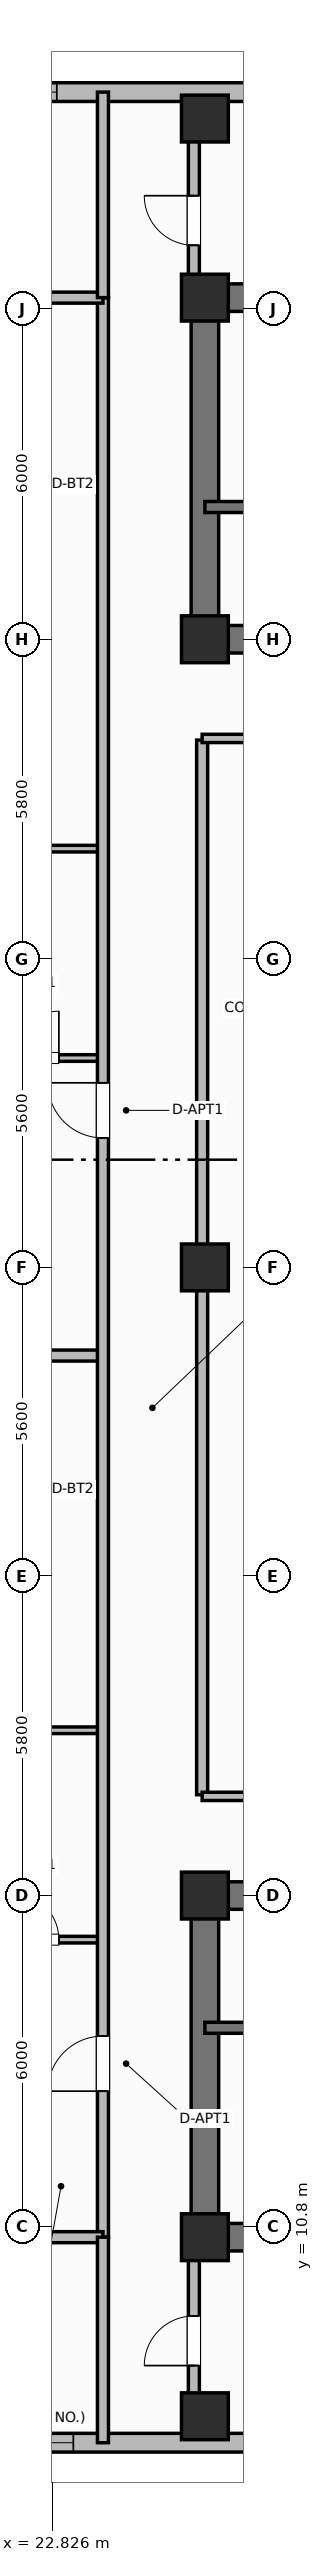
"""IFC4 building model, lengths in metres.
Left out: names, types, materials, properties, quantities, classifications, styles, units other than length and angle.
Written with IfcOpenShell. Run it as: python <this file> out.ifc"""

import sys

from ifc_helpers import new_model, si_unit, direction, frame, frame_2d, origin, origin_2d, place, context, subcontext, project, spatial, rectangle, extrude, element, fill, save


model = new_model("IFC4")
c1 = context("Model", 3, precision=1e-05, world=origin(), true_north=direction((0.0, 1.0)))
c2 = subcontext(c1, "Body", "Model", "MODEL_VIEW")
j1 = project(units=[si_unit("LENGTHUNIT", "METRE"), si_unit("PLANEANGLEUNIT", "RADIAN")], contexts=[c1])
p1 = place(None, origin())
s1 = spatial("IfcSite", under=j1, at=p1, CompositionType="ELEMENT")
p2 = place(p1, origin())
s2 = spatial("IfcBuilding", under=s1, at=p2, CompositionType="ELEMENT")
p3 = place(p2, frame((0.0, 0.0, 203.1)))
s3 = spatial("IfcBuildingStorey", under=s2, at=p3, CompositionType="ELEMENT", Elevation=203.1)
p4 = place(p3, frame((52.8, 10.6, 0.0), z_axis=(0.0, 0.0, 1.0), x_axis=(-1.0, 0.0, 0.0)))
e1 = element("IfcWall", 1, at=p4, inside=s3, PredefinedType="SHEAR", context=c2, shape_type="SweptSolid", body=[
    extrude(rectangle(XDim=27.2, YDim=0.5, at=frame_2d((13.6, 0.0))), origin(), (0.0, 0.0, 1.0), 4.2),
])
p5 = place(p3, frame((25.6, 10.85, 0.0), z_axis=(0.0, 0.0, 1.0), x_axis=(0.0, 1.0, 0.0)))
e2 = element("IfcWall", 2, at=p5, inside=s3, PredefinedType="SHEAR", context=c2, shape_type="SweptSolid", body=[
    extrude(rectangle(XDim=5.7, YDim=0.5, at=frame_2d((2.85, 0.0))), origin(), (0.0, 0.0, 1.0), 4.2),
])
p6 = place(p3, frame((25.6, 16.8, 0.0), z_axis=(0.0, 0.0, 1.0), x_axis=(1.0, 0.0, 0.0)))
e3 = element("IfcWall", 3, at=p6, inside=s3, PredefinedType="SHEAR", context=c2, shape_type="SweptSolid", body=[
    extrude(rectangle(XDim=27.2, YDim=0.5, at=frame_2d((13.6, 0.0))), origin(), (0.0, 0.0, 1.0), 4.2),
])
p7 = place(p6, frame((1.8, 0.0, 0.0)))
e4 = element("IfcOpeningElement", 4, at=p7, cuts=e3, PredefinedType="OPENING", context=c2, shape_type="SweptSolid", body=[
    extrude(rectangle(XDim=1.1, YDim=2.15, at=frame_2d((0.55, 1.075))), frame((0.0, 0.26, 0.0), z_axis=(0.0, -1.0, 0.0), x_axis=(1.0, 0.0, 0.0)), (0.0, 0.0, 1.0), 0.52),
])
p8 = place(p6, frame((5.6, 0.0, 0.0)))
e5 = element("IfcOpeningElement", 5, at=p8, cuts=e3, PredefinedType="OPENING", context=c2, shape_type="SweptSolid", body=[
    extrude(rectangle(XDim=0.85, YDim=2.1, at=frame_2d((0.425, 1.05))), frame((0.0, 0.26, 0.0), z_axis=(0.0, -1.0, 0.0), x_axis=(1.0, 0.0, 0.0)), (0.0, 0.0, 1.0), 0.52),
])
p9 = place(p6, frame((13.0, 0.0, 0.0)))
e6 = element("IfcOpeningElement", 6, at=p9, cuts=e3, PredefinedType="OPENING", context=c2, shape_type="SweptSolid", body=[
    extrude(rectangle(XDim=1.2, YDim=2.15, at=frame_2d((0.6, 1.075))), frame((0.0, 0.26, 0.0), z_axis=(0.0, -1.0, 0.0), x_axis=(1.0, 0.0, 0.0)), (0.0, 0.0, 1.0), 0.52),
])
p10 = place(p6, frame((19.2, 0.0, 0.0)))
e7 = element("IfcOpeningElement", 7, at=p10, cuts=e3, PredefinedType="OPENING", context=c2, shape_type="SweptSolid", body=[
    extrude(rectangle(XDim=0.85, YDim=2.1, at=frame_2d((0.425, 1.05))), frame((0.0, 0.26, 0.0), z_axis=(0.0, -1.0, 0.0), x_axis=(1.0, 0.0, 0.0)), (0.0, 0.0, 1.0), 0.52),
])
p11 = place(p6, frame((23.8, 0.0, 0.0)))
e8 = element("IfcOpeningElement", 8, at=p11, cuts=e3, PredefinedType="OPENING", context=c2, shape_type="SweptSolid", body=[
    extrude(rectangle(XDim=0.9, YDim=2.1, at=frame_2d((0.45, 1.05))), frame((0.0, 0.26, 0.0), z_axis=(0.0, -1.0, 0.0), x_axis=(1.0, 0.0, 0.0)), (0.0, 0.0, 1.0), 0.52),
])
p12 = place(p3, frame((25.6, 45.8, 0.0), z_axis=(0.0, 0.0, 1.0), x_axis=(1.0, 0.0, 0.0)))
e9 = element("IfcWall", 9, at=p12, inside=s3, PredefinedType="SHEAR", context=c2, shape_type="SweptSolid", body=[
    extrude(rectangle(XDim=27.2, YDim=0.5, at=frame_2d((13.6, 0.0))), origin(), (0.0, 0.0, 1.0), 4.2),
])
p13 = place(p3, frame((25.6, 39.85, 0.0), z_axis=(0.0, 0.0, 1.0), x_axis=(0.0, 1.0, 0.0)))
e10 = element("IfcWall", 10, at=p13, inside=s3, PredefinedType="SHEAR", context=c2, shape_type="SweptSolid", body=[
    extrude(rectangle(XDim=5.7, YDim=0.5, at=frame_2d((2.85, 0.0))), origin(), (0.0, 0.0, 1.0), 4.2),
])
p14 = place(p3, frame((52.8, 39.6, 0.0), z_axis=(0.0, 0.0, 1.0), x_axis=(-1.0, 0.0, 0.0)))
e11 = element("IfcWall", 11, at=p14, inside=s3, PredefinedType="SHEAR", context=c2, shape_type="SweptSolid", body=[
    extrude(rectangle(XDim=27.2, YDim=0.5, at=frame_2d((13.6, 0.0))), origin(), (0.0, 0.0, 1.0), 4.2),
])
p15 = place(p14, frame((24.2, 0.0, 0.0)))
e12 = element("IfcOpeningElement", 12, at=p15, cuts=e11, PredefinedType="OPENING", context=c2, shape_type="SweptSolid", body=[
    extrude(rectangle(XDim=1.1, YDim=2.15, at=frame_2d((0.55, 1.075))), frame((0.0, 0.26, 0.0), z_axis=(0.0, -1.0, 0.0), x_axis=(1.0, 0.0, 0.0)), (0.0, 0.0, 1.0), 0.52),
])
p16 = place(p14, frame((20.55, 0.0, 0.0)))
e13 = element("IfcOpeningElement", 13, at=p16, cuts=e11, PredefinedType="OPENING", context=c2, shape_type="SweptSolid", body=[
    extrude(rectangle(XDim=0.95, YDim=2.1, at=frame_2d((0.475, 1.05))), frame((0.0, 0.26, 0.0), z_axis=(0.0, -1.0, 0.0), x_axis=(1.0, 0.0, 0.0)), (0.0, 0.0, 1.0), 0.52),
])
p17 = place(p14, frame((15.1, 0.0, 0.0)))
e14 = element("IfcOpeningElement", 14, at=p17, cuts=e11, PredefinedType="OPENING", context=c2, shape_type="SweptSolid", body=[
    extrude(rectangle(XDim=1.2, YDim=2.15, at=frame_2d((0.6, 1.075))), frame((0.0, 0.26, 0.0), z_axis=(0.0, -1.0, 0.0), x_axis=(1.0, 0.0, 0.0)), (0.0, 0.0, 1.0), 0.52),
])
p18 = place(p14, frame((13.05, 0.0, 0.0)))
e15 = element("IfcOpeningElement", 15, at=p18, cuts=e11, PredefinedType="OPENING", context=c2, shape_type="SweptSolid", body=[
    extrude(rectangle(XDim=0.85, YDim=2.1, at=frame_2d((0.425, 1.05))), frame((0.0, 0.26, 0.0), z_axis=(0.0, -1.0, 0.0), x_axis=(1.0, 0.0, 0.0)), (0.0, 0.0, 1.0), 0.52),
])
p19 = place(p14, frame((11.0, 0.0, 0.0)))
e16 = element("IfcOpeningElement", 16, at=p19, cuts=e11, PredefinedType="OPENING", context=c2, shape_type="SweptSolid", body=[
    extrude(rectangle(XDim=0.85, YDim=2.1, at=frame_2d((0.425, 1.05))), frame((0.0, 0.26, 0.0), z_axis=(0.0, -1.0, 0.0), x_axis=(1.0, 0.0, 0.0)), (0.0, 0.0, 1.0), 0.52),
])
p20 = place(p14, frame((7.35, 0.0, 0.0)))
e17 = element("IfcOpeningElement", 17, at=p20, cuts=e11, PredefinedType="OPENING", context=c2, shape_type="SweptSolid", body=[
    extrude(rectangle(XDim=0.85, YDim=2.1, at=frame_2d((0.425, 1.05))), frame((0.0, 0.26, 0.0), z_axis=(0.0, -1.0, 0.0), x_axis=(1.0, 0.0, 0.0)), (0.0, 0.0, 1.0), 0.52),
])
p21 = place(p14, frame((4.2, 0.0, 0.0)))
e18 = element("IfcOpeningElement", 18, at=p21, cuts=e11, PredefinedType="OPENING", context=c2, shape_type="SweptSolid", body=[
    extrude(rectangle(XDim=1.3, YDim=2.2, at=frame_2d((0.65, 1.1))), frame((0.0, 0.26, 0.0), z_axis=(0.0, -1.0, 0.0), x_axis=(1.0, 0.0, 0.0)), (0.0, 0.0, 1.0), 0.52),
])
for number, where, z_axis, x_axis in (
    (19, (25.6, 10.6, 0.0), (0.0, 0.0, 1.0), (1.0, 0.0, 0.0)),
    (20, (25.6, 16.8, 0.0), (0.0, 0.0, 1.0), (1.0, 0.0, 0.0)),
    (21, (25.6, 39.6, 0.0), (0.0, 0.0, 1.0), (1.0, 0.0, 0.0)),
    (22, (25.6, 45.8, 0.0), (0.0, 0.0, 1.0), (1.0, 0.0, 0.0)),
    (23, (25.6, 28.2, 0.0), (0.0, 0.0, 1.0), (1.0, 0.0, 0.0)),
    (24, (25.6, 7.35, 0.0), (0.0, 0.0, 1.0), (1.0, 0.0, 0.0)),
    (25, (25.6, 49.05, 0.0), (0.0, 0.0, 1.0), (1.0, 0.0, 0.0)),
):
    element("IfcColumn", number, at=place(p3, frame(where, z_axis=z_axis, x_axis=x_axis)), inside=s3, PredefinedType="COLUMN", context=c2, shape_type="SweptSolid", body=[
        extrude(rectangle(XDim=0.85, YDim=0.85, at=origin_2d()), origin(), (0.0, 0.0, 1.0), 4.2),
    ])
p22 = place(p3, frame((20.2, 6.87, 0.0), z_axis=(0.0, 0.0, 1.0), x_axis=(1.0, 0.0, 0.0)))
e26 = element("IfcWall", 26, at=p22, inside=s3, PredefinedType="SOLIDWALL", context=c2, shape_type="SweptSolid", body=[
    extrude(rectangle(XDim=15.8, YDim=0.34, at=frame_2d((7.9, 0.0))), origin(), (0.0, 0.0, 1.0), 3.22),
])
p23 = place(p22, frame((1.212, 0.0, 0.85)))
e27 = element("IfcOpeningElement", 27, at=p23, cuts=e26, PredefinedType="OPENING", context=c2, shape_type="SweptSolid", body=[
    extrude(rectangle(XDim=1.8, YDim=1.85, at=frame_2d((0.9, 0.925))), frame((0.0, 0.18, 0.0), z_axis=(0.0, -1.0, 0.0), x_axis=(1.0, 0.0, 0.0)), (0.0, 0.0, 1.0), 0.36),
])
p24 = place(p22, frame((8.113, 0.0, 0.85)))
e28 = element("IfcOpeningElement", 28, at=p24, cuts=e26, PredefinedType="OPENING", context=c2, shape_type="SweptSolid", body=[
    extrude(rectangle(XDim=1.8, YDim=1.85, at=frame_2d((0.9, 0.925))), frame((0.0, 0.18, 0.0), z_axis=(0.0, -1.0, 0.0), x_axis=(1.0, 0.0, 0.0)), (0.0, 0.0, 1.0), 0.36),
])
p25 = place(p22, frame((11.738, 0.0, 0.85)))
e29 = element("IfcOpeningElement", 29, at=p25, cuts=e26, PredefinedType="OPENING", context=c2, shape_type="SweptSolid", body=[
    extrude(rectangle(XDim=1.8, YDim=1.85, at=frame_2d((0.9, 0.925))), frame((0.0, 0.18, 0.0), z_axis=(0.0, -1.0, 0.0), x_axis=(1.0, 0.0, 0.0)), (0.0, 0.0, 1.0), 0.36),
])
p26 = place(p3, frame((27.55, 49.53, 0.0), z_axis=(0.0, 0.0, 1.0), x_axis=(-1.0, 0.0, 0.0)))
e30 = element("IfcWall", 30, at=p26, inside=s3, PredefinedType="SOLIDWALL", context=c2, shape_type="SweptSolid", body=[
    extrude(rectangle(XDim=7.35, YDim=0.34, at=frame_2d((3.675, 0.0))), origin(), (0.0, 0.0, 1.0), 3.22),
])
p27 = place(p26, frame((4.637, 0.0, 0.95)))
e31 = element("IfcOpeningElement", 31, at=p27, cuts=e30, PredefinedType="OPENING", context=c2, shape_type="SweptSolid", body=[
    extrude(rectangle(XDim=1.1, YDim=1.65, at=frame_2d((0.55, 0.825))), frame((0.0, 0.18, 0.0), z_axis=(0.0, -1.0, 0.0), x_axis=(1.0, 0.0, 0.0)), (0.0, 0.0, 1.0), 0.36),
])
p28 = place(p3, frame((25.6, 14.4, 0.0), z_axis=(0.0, 0.0, 1.0), x_axis=(1.0, 0.0, 0.0)))
e32 = element("IfcWall", 32, at=p28, inside=s3, PredefinedType="SHEAR", context=c2, shape_type="SweptSolid", body=[
    extrude(rectangle(XDim=9.55, YDim=0.2, at=frame_2d((4.775, 0.0))), origin(), (0.0, 0.0, 1.0), 4.2),
])
p29 = place(p28, frame((1.05, 0.0, 0.0)))
e33 = element("IfcOpeningElement", 33, at=p29, cuts=e32, PredefinedType="OPENING", context=c2, shape_type="SweptSolid", body=[
    extrude(rectangle(XDim=1.1, YDim=2.15, at=frame_2d((0.55, 1.075))), frame((0.0, 0.11, 0.0), z_axis=(0.0, -1.0, 0.0), x_axis=(1.0, 0.0, 0.0)), (0.0, 0.0, 1.0), 0.22),
])
p30 = place(p3, frame((35.15, 42.0, 0.0), z_axis=(0.0, 0.0, 1.0), x_axis=(-1.0, 0.0, 0.0)))
e34 = element("IfcWall", 34, at=p30, inside=s3, PredefinedType="SHEAR", context=c2, shape_type="SweptSolid", body=[
    extrude(rectangle(XDim=9.55, YDim=0.2, at=frame_2d((4.775, 0.0))), origin(), (0.0, 0.0, 1.0), 4.2),
])
p31 = place(p30, frame((7.25, 0.0, 0.0)))
e35 = element("IfcOpeningElement", 35, at=p31, cuts=e34, PredefinedType="OPENING", context=c2, shape_type="SweptSolid", body=[
    extrude(rectangle(XDim=1.1, YDim=2.15, at=frame_2d((0.55, 1.075))), frame((0.0, 0.11, 0.0), z_axis=(0.0, -1.0, 0.0), x_axis=(1.0, 0.0, 0.0)), (0.0, 0.0, 1.0), 0.22),
])
p32 = place(p3, frame((25.55, 18.63, 0.0), z_axis=(0.0, 0.0, 1.0), x_axis=(0.0, 1.0, 0.0)))
e36 = element("IfcWall", 36, at=p32, inside=s3, PredefinedType="PARTITIONING", context=c2, shape_type="SweptSolid", body=[
    extrude(rectangle(XDim=19.14, YDim=0.2, at=frame_2d((9.57, 0.0))), origin(), (0.0, 0.0, 1.0), 3.05),
])
for number, where, z_axis, x_axis in (
    (37, (25.55, 18.6, 0.0), (0.0, 0.0, 1.0), (1.0, 0.0, 0.0)),
    (38, (25.55, 37.8, 0.0), (0.0, 0.0, 1.0), (1.0, 0.0, 0.0)),
):
    element("IfcWall", number, at=place(p3, frame(where, z_axis=z_axis, x_axis=x_axis)), inside=s3, PredefinedType="PARTITIONING", context=c2, shape_type="SweptSolid", body=[
        extrude(rectangle(XDim=3.5, YDim=0.15, at=frame_2d((1.75, 0.0))), origin(), (0.0, 0.0, 1.0), 3.05),
    ])
p33 = place(p3, frame((21.5, 16.0, 0.0), z_axis=(0.0, 0.0, 1.0), x_axis=(1.0, 0.0, 0.0)))
e39 = element("IfcWall", 39, at=p33, inside=s3, PredefinedType="PARTITIONING", context=c2, shape_type="SweptSolid", body=[
    extrude(rectangle(XDim=2.25, YDim=0.12, at=frame_2d((1.125, 0.0))), origin(), (0.0, 0.0, 1.0), 3.05),
])
p34 = place(p33, frame((0.6, 0.0, 0.0)))
e40 = element("IfcOpeningElement", 40, at=p34, cuts=e39, PredefinedType="OPENING", context=c2, shape_type="SweptSolid", body=[
    extrude(rectangle(XDim=0.85, YDim=2.1, at=frame_2d((0.425, 1.05))), frame((0.0, 0.07, 0.0), z_axis=(0.0, -1.0, 0.0), x_axis=(1.0, 0.0, 0.0)), (0.0, 0.0, 1.0), 0.14),
])
p35 = place(p3, frame((21.5, 19.8, 0.0), z_axis=(0.0, 0.0, 1.0), x_axis=(1.0, 0.0, 0.0)))
e41 = element("IfcWall", 41, at=p35, inside=s3, PredefinedType="PARTITIONING", context=c2, shape_type="SweptSolid", body=[
    extrude(rectangle(XDim=2.25, YDim=0.12, at=frame_2d((1.125, 0.0))), origin(), (0.0, 0.0, 1.0), 3.05),
])
p36 = place(p3, frame((16.97, 26.6, 0.0), z_axis=(0.0, 0.0, 1.0), x_axis=(1.0, 0.0, 0.0)))
e42 = element("IfcWall", 42, at=p36, inside=s3, PredefinedType="PARTITIONING", context=c2, shape_type="SweptSolid", body=[
    extrude(rectangle(XDim=6.78, YDim=0.2, at=frame_2d((3.39, 0.0))), origin(), (0.0, 0.0, 1.0), 3.05),
])
p37 = place(p3, frame((21.5, 32.0, 0.0), z_axis=(0.0, 0.0, 1.0), x_axis=(1.0, 0.0, 0.0)))
e43 = element("IfcWall", 43, at=p37, inside=s3, PredefinedType="PARTITIONING", context=c2, shape_type="SweptSolid", body=[
    extrude(rectangle(XDim=2.25, YDim=0.12, at=frame_2d((1.125, 0.0))), origin(), (0.0, 0.0, 1.0), 3.05),
])
p38 = place(p37, frame((0.6, 0.0, 0.0)))
e44 = element("IfcOpeningElement", 44, at=p38, cuts=e43, PredefinedType="OPENING", context=c2, shape_type="SweptSolid", body=[
    extrude(rectangle(XDim=0.85, YDim=2.1, at=frame_2d((0.425, 1.05))), frame((0.0, 0.07, 0.0), z_axis=(0.0, -1.0, 0.0), x_axis=(1.0, 0.0, 0.0)), (0.0, 0.0, 1.0), 0.14),
])
p39 = place(p3, frame((21.5, 35.8, 0.0), z_axis=(0.0, 0.0, 1.0), x_axis=(1.0, 0.0, 0.0)))
e45 = element("IfcWall", 45, at=p39, inside=s3, PredefinedType="PARTITIONING", context=c2, shape_type="SweptSolid", body=[
    extrude(rectangle(XDim=2.25, YDim=0.12, at=frame_2d((1.125, 0.0))), origin(), (0.0, 0.0, 1.0), 3.05),
])
p40 = place(p3, frame((23.75, 10.6, 0.0), z_axis=(0.0, 0.0, 1.0), x_axis=(0.0, 1.0, 0.0)))
e46 = element("IfcWall", 46, at=p40, inside=s3, PredefinedType="PARTITIONING", context=c2, shape_type="SweptSolid", body=[
    extrude(rectangle(XDim=35.2, YDim=0.2, at=frame_2d((17.6, 0.0))), origin(), (0.0, 0.0, 1.0), 3.05),
])
p41 = place(p40, frame((2.65, 0.0, 0.0)))
e47 = element("IfcOpeningElement", 47, at=p41, cuts=e46, PredefinedType="OPENING", context=c2, shape_type="SweptSolid", body=[
    extrude(rectangle(XDim=1.0, YDim=2.15, at=frame_2d((0.5, 1.075))), frame((0.0, 0.11, 0.0), z_axis=(0.0, -1.0, 0.0), x_axis=(1.0, 0.0, 0.0)), (0.0, 0.0, 1.0), 0.22),
])
p42 = place(p40, frame((19.95, 0.0, 0.0)))
e48 = element("IfcOpeningElement", 48, at=p42, cuts=e46, PredefinedType="OPENING", context=c2, shape_type="SweptSolid", body=[
    extrude(rectangle(XDim=1.0, YDim=2.15, at=frame_2d((0.5, 1.075))), frame((0.0, 0.11, 0.0), z_axis=(0.0, -1.0, 0.0), x_axis=(1.0, 0.0, 0.0)), (0.0, 0.0, 1.0), 0.22),
])
for number, where, z_axis, x_axis in (
    (49, (16.99, 10.6, 0.0), (0.0, 0.0, 1.0), (1.0, 0.0, 0.0)),
    (50, (16.99, 45.8, 0.0), (0.0, 0.0, 1.0), (1.0, 0.0, 0.0)),
):
    element("IfcWall", number, at=place(p3, frame(where, z_axis=z_axis, x_axis=x_axis)), inside=s3, PredefinedType="PARTITIONING", context=c2, shape_type="SweptSolid", body=[
        extrude(rectangle(XDim=6.76, YDim=0.2, at=frame_2d((3.38, 0.0))), origin(), (0.0, 0.0, 1.0), 3.05),
    ])
for number, where, z_axis, x_axis in (
    (51, (23.75, 6.87, 0.0), (0.0, 0.0, 1.0), (0.0, 1.0, 0.0)),
    (52, (23.75, 45.8, 0.0), (0.0, 0.0, 1.0), (0.0, 1.0, 0.0)),
):
    element("IfcWall", number, at=place(p3, frame(where, z_axis=z_axis, x_axis=x_axis)), inside=s3, PredefinedType="PARTITIONING", context=c2, shape_type="SweptSolid", body=[
        extrude(rectangle(XDim=3.73, YDim=0.2, at=frame_2d((1.865, 0.0))), origin(), (0.0, 0.0, 1.0), 3.05),
    ])
p43 = place(p3, frame((25.4, 7.62, 0.0), z_axis=(0.0, 0.0, 1.0), x_axis=(0.0, 1.0, 0.0)))
e53 = element("IfcWall", 53, at=p43, inside=s3, PredefinedType="PARTITIONING", context=c2, shape_type="SweptSolid", body=[
    extrude(rectangle(XDim=2.68, YDim=0.2, at=frame_2d((1.34, 0.0))), origin(), (0.0, 0.0, 1.0), 3.05),
])
p44 = place(p43, frame((0.65, 0.0, 0.0)))
e54 = element("IfcOpeningElement", 54, at=p44, cuts=e53, PredefinedType="OPENING", context=c2, shape_type="SweptSolid", body=[
    extrude(rectangle(XDim=0.9, YDim=2.1, at=frame_2d((0.45, 1.05))), frame((0.0, 0.11, 0.0), z_axis=(0.0, -1.0, 0.0), x_axis=(1.0, 0.0, 0.0)), (0.0, 0.0, 1.0), 0.22),
])
p45 = place(p3, frame((25.4, 46.1, 0.0), z_axis=(0.0, 0.0, 1.0), x_axis=(0.0, 1.0, 0.0)))
e55 = element("IfcWall", 55, at=p45, inside=s3, PredefinedType="PARTITIONING", context=c2, shape_type="SweptSolid", body=[
    extrude(rectangle(XDim=2.68, YDim=0.2, at=frame_2d((1.34, 0.0))), origin(), (0.0, 0.0, 1.0), 3.05),
])
p46 = place(p45, frame((0.65, 0.0, 0.0)))
e56 = element("IfcOpeningElement", 56, at=p46, cuts=e55, PredefinedType="OPENING", context=c2, shape_type="SweptSolid", body=[
    extrude(rectangle(XDim=0.9, YDim=2.1, at=frame_2d((0.45, 1.05))), frame((0.0, 0.11, 0.0), z_axis=(0.0, -1.0, 0.0), x_axis=(1.0, 0.0, 0.0)), (0.0, 0.0, 1.0), 0.22),
])
p47 = place(p23, origin())
e57 = element("IfcWindow", 57, at=p47, inside=s3, PartitioningType="SINGLE_PANEL", PredefinedType="WINDOW", context=c2, shape_type="SweptSolid", body=[
    extrude(rectangle(XDim=1.8, YDim=1.85, at=frame_2d((0.9, 0.925))), frame((0.0, 0.03, 0.0), z_axis=(0.0, -1.0, 0.0), x_axis=(1.0, 0.0, 0.0)), (0.0, 0.0, 1.0), 0.06),
])
fill(e27, e57)
p48 = place(p27, origin())
e58 = element("IfcWindow", 58, at=p48, inside=s3, PartitioningType="SINGLE_PANEL", PredefinedType="WINDOW", context=c2, shape_type="SweptSolid", body=[
    extrude(rectangle(XDim=1.1, YDim=1.65, at=frame_2d((0.55, 0.825))), frame((0.0, 0.03, 0.0), z_axis=(0.0, -1.0, 0.0), x_axis=(1.0, 0.0, 0.0)), (0.0, 0.0, 1.0), 0.06),
])
fill(e31, e58)
p49 = place(p34, origin())
e59 = element("IfcDoor", 59, at=p49, inside=s3, OperationType="SINGLE_SWING_LEFT", PredefinedType="DOOR", context=c2, shape_type="SweptSolid", body=[
    extrude(rectangle(XDim=0.85, YDim=2.1, at=frame_2d((0.425, 1.05))), frame((0.0, 0.025, 0.0), z_axis=(0.0, -1.0, 0.0), x_axis=(1.0, 0.0, 0.0)), (0.0, 0.0, 1.0), 0.05),
])
fill(e40, e59)
p50 = place(p38, origin())
e60 = element("IfcDoor", 60, at=p50, inside=s3, OperationType="SINGLE_SWING_RIGHT", PredefinedType="DOOR", context=c2, shape_type="SweptSolid", body=[
    extrude(rectangle(XDim=0.85, YDim=2.1, at=frame_2d((0.425, 1.05))), frame((0.0, 0.025, 0.0), z_axis=(0.0, -1.0, 0.0), x_axis=(1.0, 0.0, 0.0)), (0.0, 0.0, 1.0), 0.05),
])
fill(e44, e60)
p51 = place(p41, origin())
e61 = element("IfcDoor", 61, at=p51, inside=s3, OperationType="SINGLE_SWING_LEFT", PredefinedType="DOOR", context=c2, shape_type="SweptSolid", body=[
    extrude(rectangle(XDim=1.0, YDim=2.15, at=frame_2d((0.5, 1.075))), frame((0.0, 0.025, 0.0), z_axis=(0.0, -1.0, 0.0), x_axis=(1.0, 0.0, 0.0)), (0.0, 0.0, 1.0), 0.05),
])
fill(e47, e61)
p52 = place(p42, origin())
e62 = element("IfcDoor", 62, at=p52, inside=s3, OperationType="SINGLE_SWING_RIGHT", PredefinedType="DOOR", context=c2, shape_type="SweptSolid", body=[
    extrude(rectangle(XDim=1.0, YDim=2.15, at=frame_2d((0.5, 1.075))), frame((0.0, 0.025, 0.0), z_axis=(0.0, -1.0, 0.0), x_axis=(1.0, 0.0, 0.0)), (0.0, 0.0, 1.0), 0.05),
])
fill(e48, e62)
p53 = place(p44, origin())
e63 = element("IfcDoor", 63, at=p53, inside=s3, OperationType="SINGLE_SWING_LEFT", PredefinedType="DOOR", context=c2, shape_type="SweptSolid", body=[
    extrude(rectangle(XDim=0.9, YDim=2.1, at=frame_2d((0.45, 1.05))), frame((0.0, 0.025, 0.0), z_axis=(0.0, -1.0, 0.0), x_axis=(1.0, 0.0, 0.0)), (0.0, 0.0, 1.0), 0.05),
])
fill(e54, e63)
p54 = place(p46, origin())
e64 = element("IfcDoor", 64, at=p54, inside=s3, OperationType="SINGLE_SWING_RIGHT", PredefinedType="DOOR", context=c2, shape_type="SweptSolid", body=[
    extrude(rectangle(XDim=0.9, YDim=2.1, at=frame_2d((0.45, 1.05))), frame((0.0, 0.025, 0.0), z_axis=(0.0, -1.0, 0.0), x_axis=(1.0, 0.0, 0.0)), (0.0, 0.0, 1.0), 0.05),
])
fill(e56, e64)
save(model, sys.argv[1])
